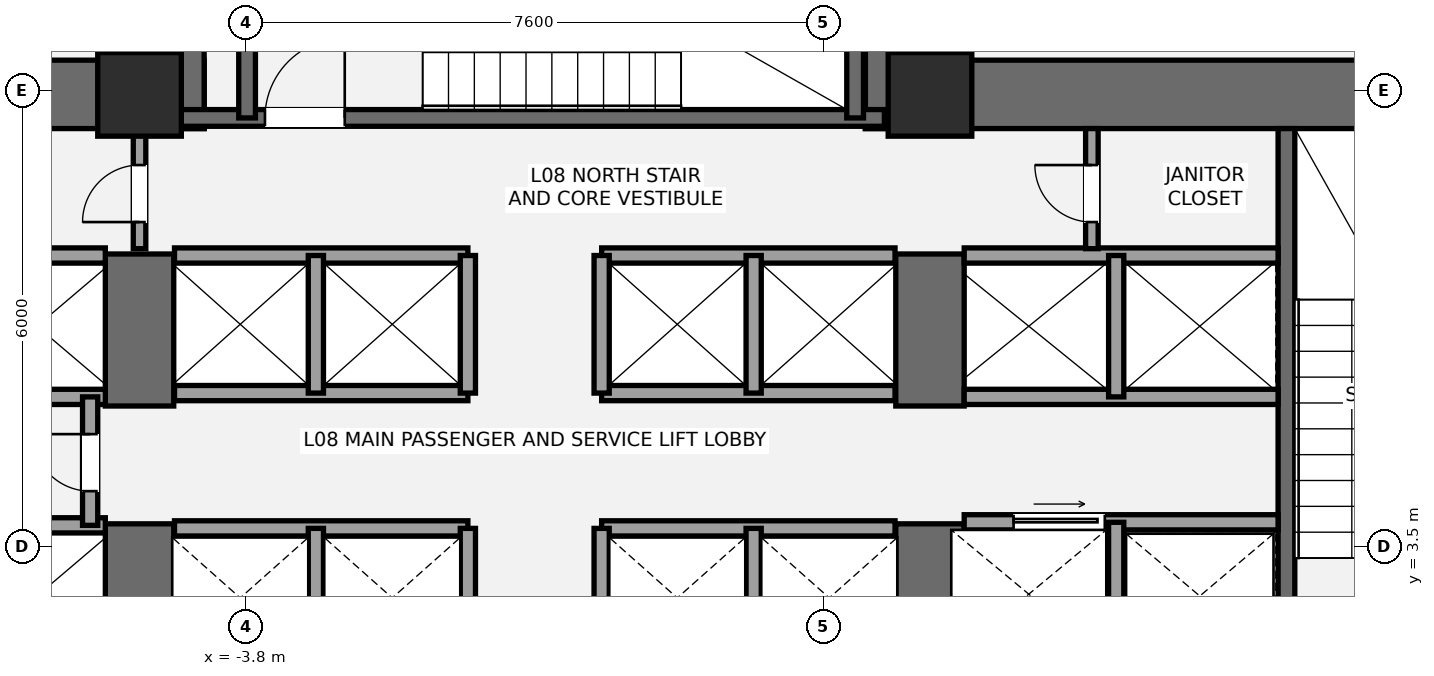
"""IFC4 building model, lengths in metres.
Left out: names, types, materials, properties, quantities, classifications, styles, units other than length and angle.
Written with IfcOpenShell. Run it as: python <this file> out.ifc"""

import sys

from ifc_helpers import new_model, si_unit, direction, frame, frame_2d, origin, origin_2d, place, context, subcontext, project, spatial, rectangle, extrude, element, fill, save


model = new_model("IFC4")
c1 = context("Model", 3, precision=1e-05, world=origin(), true_north=direction((0.0, 1.0)))
c2 = subcontext(c1, "Body", "Model", "MODEL_VIEW")
j1 = project(units=[si_unit("LENGTHUNIT", "METRE"), si_unit("PLANEANGLEUNIT", "RADIAN")], contexts=[c1])
p1 = place(None, origin())
s1 = spatial("IfcSite", under=j1, at=p1, CompositionType="ELEMENT")
p2 = place(p1, origin())
s2 = spatial("IfcBuilding", under=s1, at=p2, CompositionType="ELEMENT")
p3 = place(p2, frame((0.0, 0.0, 34.2)))
s3 = spatial("IfcBuildingStorey", under=s2, at=p3, CompositionType="ELEMENT", Elevation=34.2)
p4 = place(p3, frame((-14.05, 9.45, 0.0), z_axis=(0.0, 0.0, 1.0), x_axis=(1.0, 0.0, 0.0)))
e1 = element("IfcWall", 1, at=p4, inside=s3, PredefinedType="SHEAR", context=c2, shape_type="SweptSolid", body=[
    extrude(rectangle(XDim=9.7, YDim=0.9, at=frame_2d((4.85, 0.0))), origin(), (0.0, 0.0, 1.0), 3.6),
])
p5 = place(p3, frame((-5.2, 0.95, 0.0), z_axis=(0.0, 0.0, 1.0), x_axis=(0.0, 1.0, 0.0)))
e2 = element("IfcWall", 2, at=p5, inside=s3, PredefinedType="SHEAR", context=c2, shape_type="SweptSolid", body=[
    extrude(rectangle(XDim=2.85, YDim=0.9, at=frame_2d((1.425, 0.0))), origin(), (0.0, 0.0, 1.0), 3.6),
])
p6 = place(p3, frame((-5.2, 5.35, 0.0), z_axis=(0.0, 0.0, 1.0), x_axis=(0.0, 1.0, 0.0)))
e3 = element("IfcWall", 3, at=p6, inside=s3, PredefinedType="SHEAR", context=c2, shape_type="SweptSolid", body=[
    extrude(rectangle(XDim=2.0, YDim=0.9, at=frame_2d((1.0, 0.0))), origin(), (0.0, 0.0, 1.0), 3.6),
])
p7 = place(p3, frame((4.35, 9.45, 0.0), z_axis=(0.0, 0.0, 1.0), x_axis=(1.0, 0.0, 0.0)))
e4 = element("IfcWall", 4, at=p7, inside=s3, PredefinedType="SHEAR", context=c2, shape_type="SweptSolid", body=[
    extrude(rectangle(XDim=9.7, YDim=0.9, at=frame_2d((4.85, 0.0))), origin(), (0.0, 0.0, 1.0), 3.6),
])
p8 = place(p3, frame((5.2, 0.95, 0.0), z_axis=(0.0, 0.0, 1.0), x_axis=(0.0, 1.0, 0.0)))
e5 = element("IfcWall", 5, at=p8, inside=s3, PredefinedType="SHEAR", context=c2, shape_type="SweptSolid", body=[
    extrude(rectangle(XDim=2.85, YDim=0.9, at=frame_2d((1.425, 0.0))), origin(), (0.0, 0.0, 1.0), 3.6),
])
p9 = place(p3, frame((5.2, 5.35, 0.0), z_axis=(0.0, 0.0, 1.0), x_axis=(0.0, 1.0, 0.0)))
e6 = element("IfcWall", 6, at=p9, inside=s3, PredefinedType="SHEAR", context=c2, shape_type="SweptSolid", body=[
    extrude(rectangle(XDim=2.0, YDim=0.9, at=frame_2d((1.0, 0.0))), origin(), (0.0, 0.0, 1.0), 3.6),
])
p10 = place(p3, frame((9.89, 1.85, 0.0), z_axis=(0.0, 0.0, 1.0), x_axis=(0.0, 1.0, 0.0)))
e7 = element("IfcWall", 7, at=p10, inside=s3, PredefinedType="SHEAR", context=c2, shape_type="SweptSolid", body=[
    extrude(rectangle(XDim=7.15, YDim=0.22, at=frame_2d((3.575, 0.0))), origin(), (0.0, 0.0, 1.0), 3.6),
])
for number, where, z_axis, x_axis in (
    (8, (-4.8, 9.0, 0.0), (0.0, 0.0, 1.0), (0.0, 1.0, 0.0)),
    (9, (4.8, 9.0, 0.0), (0.0, 0.0, 1.0), (0.0, 1.0, 0.0)),
):
    element("IfcWall", number, at=place(p3, frame(where, z_axis=z_axis, x_axis=x_axis)), inside=s3, PredefinedType="SHEAR", context=c2, shape_type="SweptSolid", body=[
        extrude(rectangle(XDim=4.3, YDim=0.9, at=frame_2d((2.15, 0.0))), origin(), (0.0, 0.0, 1.0), 3.6),
    ])
p11 = place(p3, frame((-4.7, 9.14, 0.0), z_axis=(0.0, 0.0, 1.0), x_axis=(1.0, 0.0, 0.0)))
e10 = element("IfcWall", 10, at=p11, inside=s3, PredefinedType="SHEAR", context=c2, shape_type="SweptSolid", body=[
    extrude(rectangle(XDim=9.3, YDim=0.22, at=frame_2d((4.65, 0.0))), origin(), (0.0, 0.0, 1.0), 3.6),
])
p12 = place(p11, frame((1.15, 0.0, 0.0)))
e11 = element("IfcOpeningElement", 11, at=p12, cuts=e10, PredefinedType="OPENING", context=c2, shape_type="SweptSolid", body=[
    extrude(rectangle(XDim=1.05, YDim=2.15, at=frame_2d((0.525, 1.075))), frame((0.0, 0.12, 0.0), z_axis=(0.0, -1.0, 0.0), x_axis=(1.0, 0.0, 0.0)), (0.0, 0.0, 1.0), 0.24),
])
for number, where, z_axis, x_axis in (
    (12, (-3.785, 9.14, 0.0), (0.0, 0.0, 1.0), (0.0, 1.0, 0.0)),
    (13, (4.215, 9.14, 0.0), (0.0, 0.0, 1.0), (0.0, 1.0, 0.0)),
):
    element("IfcWall", number, at=place(p3, frame(where, z_axis=z_axis, x_axis=x_axis)), inside=s3, PredefinedType="SHEAR", context=c2, shape_type="SweptSolid", body=[
        extrude(rectangle(XDim=3.26, YDim=0.22, at=frame_2d((1.63, 0.0))), origin(), (0.0, 0.0, 1.0), 3.6),
    ])
for number, where, z_axis, x_axis in (
    (14, (-5.2, 9.45, 0.0), (0.0, 0.0, 1.0), (1.0, 0.0, 0.0)),
    (15, (5.2, 9.45, 0.0), (0.0, 0.0, 1.0), (1.0, 0.0, 0.0)),
):
    element("IfcColumn", number, at=place(p3, frame(where, z_axis=z_axis, x_axis=x_axis)), inside=s3, PredefinedType="COLUMN", context=c2, shape_type="SweptSolid", body=[
        extrude(rectangle(XDim=1.1, YDim=1.1, at=origin_2d()), origin(), (0.0, 0.0, 1.0), 3.6),
    ])
for number, where, z_axis, x_axis in (
    (16, (-9.78, 3.78, 0.0), (0.0, 0.0, 1.0), (1.0, 0.0, 0.0)),
    (17, (-9.78, 5.47, 0.0), (0.0, 0.0, 1.0), (1.0, 0.0, 0.0)),
    (18, (-9.78, 7.33, 0.0), (0.0, 0.0, 1.0), (1.0, 0.0, 0.0)),
):
    element("IfcWall", number, at=place(p3, frame(where, z_axis=z_axis, x_axis=x_axis)), inside=s3, PredefinedType="SOLIDWALL", context=c2, shape_type="SweptSolid", body=[
        extrude(rectangle(XDim=4.13, YDim=0.2, at=frame_2d((2.065, 0.0))), origin(), (0.0, 0.0, 1.0), 3.4),
    ])
p13 = place(p3, frame((-5.85, 3.78, 0.0), z_axis=(0.0, 0.0, 1.0), x_axis=(0.0, 1.0, 0.0)))
e19 = element("IfcWall", 19, at=p13, inside=s3, PredefinedType="SOLIDWALL", context=c2, shape_type="SweptSolid", body=[
    extrude(rectangle(XDim=1.69, YDim=0.2, at=frame_2d((0.845, 0.0))), origin(), (0.0, 0.0, 1.0), 3.4),
])
p14 = place(p13, frame((0.45, 0.0, 0.0)))
e20 = element("IfcOpeningElement", 20, at=p14, cuts=e19, PredefinedType="OPENING", context=c2, shape_type="SweptSolid", body=[
    extrude(rectangle(XDim=0.75, YDim=2.1, at=frame_2d((0.375, 1.05))), frame((0.0, 0.11, 0.0), z_axis=(0.0, -1.0, 0.0), x_axis=(1.0, 0.0, 0.0)), (0.0, 0.0, 1.0), 0.22),
])
p15 = place(p3, frame((5.65, 3.82, 0.0), z_axis=(0.0, 0.0, 1.0), x_axis=(1.0, 0.0, 0.0)))
e21 = element("IfcWall", 21, at=p15, inside=s3, PredefinedType="SOLIDWALL", context=c2, shape_type="SweptSolid", body=[
    extrude(rectangle(XDim=4.13, YDim=0.2, at=frame_2d((2.065, 0.0))), origin(), (0.0, 0.0, 1.0), 3.4),
])
p16 = place(p15, frame((0.65, 0.0, 0.0)))
e22 = element("IfcOpeningElement", 22, at=p16, cuts=e21, PredefinedType="OPENING", context=c2, shape_type="SweptSolid", body=[
    extrude(rectangle(XDim=1.2, YDim=2.2, at=frame_2d((0.6, 1.1))), frame((0.0, 0.11, 0.0), z_axis=(0.0, -1.0, 0.0), x_axis=(1.0, 0.0, 0.0)), (0.0, 0.0, 1.0), 0.22),
])
p17 = place(p3, frame((7.65, 1.85, 0.0), z_axis=(0.0, 0.0, 1.0), x_axis=(0.0, 1.0, 0.0)))
e23 = element("IfcWall", 23, at=p17, inside=s3, PredefinedType="SOLIDWALL", context=c2, shape_type="SweptSolid", body=[
    extrude(rectangle(XDim=1.97, YDim=0.2, at=frame_2d((0.985, 0.0))), origin(), (0.0, 0.0, 1.0), 3.4),
])
for number, where, z_axis, x_axis in (
    (24, (5.65, 5.47, 0.0), (0.0, 0.0, 1.0), (1.0, 0.0, 0.0)),
    (25, (5.65, 7.33, 0.0), (0.0, 0.0, 1.0), (1.0, 0.0, 0.0)),
):
    element("IfcWall", number, at=place(p3, frame(where, z_axis=z_axis, x_axis=x_axis)), inside=s3, PredefinedType="SOLIDWALL", context=c2, shape_type="SweptSolid", body=[
        extrude(rectangle(XDim=4.13, YDim=0.2, at=frame_2d((2.065, 0.0))), origin(), (0.0, 0.0, 1.0), 3.4),
    ])
p18 = place(p3, frame((7.65, 5.47, 0.0), z_axis=(0.0, 0.0, 1.0), x_axis=(0.0, 1.0, 0.0)))
e26 = element("IfcWall", 26, at=p18, inside=s3, PredefinedType="SOLIDWALL", context=c2, shape_type="SweptSolid", body=[
    extrude(rectangle(XDim=1.86, YDim=0.2, at=frame_2d((0.93, 0.0))), origin(), (0.0, 0.0, 1.0), 3.4),
])
for number, where, z_axis, x_axis in (
    (27, (-4.74, 3.74, 0.0), (0.0, 0.0, 1.0), (1.0, 0.0, 0.0)),
    (28, (0.88, 3.74, 0.0), (0.0, 0.0, 1.0), (1.0, 0.0, 0.0)),
):
    element("IfcWall", number, at=place(p3, frame(where, z_axis=z_axis, x_axis=x_axis)), inside=s3, PredefinedType="SOLIDWALL", context=c2, shape_type="SweptSolid", body=[
        extrude(rectangle(XDim=3.86, YDim=0.2, at=frame_2d((1.93, 0.0))), origin(), (0.0, 0.0, 1.0), 3.4),
    ])
for number, where, z_axis, x_axis in (
    (29, (-2.88, 1.92, 0.0), (0.0, 0.0, 1.0), (0.0, 1.0, 0.0)),
    (30, (2.88, 1.92, 0.0), (0.0, 0.0, 1.0), (0.0, 1.0, 0.0)),
    (31, (-0.88, 1.92, 0.0), (0.0, 0.0, 1.0), (0.0, 1.0, 0.0)),
    (32, (0.88, 1.92, 0.0), (0.0, 0.0, 1.0), (0.0, 1.0, 0.0)),
):
    element("IfcWall", number, at=place(p3, frame(where, z_axis=z_axis, x_axis=x_axis)), inside=s3, PredefinedType="SOLIDWALL", context=c2, shape_type="SweptSolid", body=[
        extrude(rectangle(XDim=1.82, YDim=0.2, at=frame_2d((0.91, 0.0))), origin(), (0.0, 0.0, 1.0), 3.4),
    ])
for number, where, z_axis, x_axis in (
    (33, (-4.74, 5.52, 0.0), (0.0, 0.0, 1.0), (1.0, 0.0, 0.0)),
    (34, (0.88, 5.52, 0.0), (0.0, 0.0, 1.0), (1.0, 0.0, 0.0)),
    (35, (-4.74, 7.33, 0.0), (0.0, 0.0, 1.0), (1.0, 0.0, 0.0)),
    (36, (0.88, 7.33, 0.0), (0.0, 0.0, 1.0), (1.0, 0.0, 0.0)),
):
    element("IfcWall", number, at=place(p3, frame(where, z_axis=z_axis, x_axis=x_axis)), inside=s3, PredefinedType="SOLIDWALL", context=c2, shape_type="SweptSolid", body=[
        extrude(rectangle(XDim=3.86, YDim=0.2, at=frame_2d((1.93, 0.0))), origin(), (0.0, 0.0, 1.0), 3.4),
    ])
for number, where, z_axis, x_axis in (
    (37, (-2.88, 5.52, 0.0), (0.0, 0.0, 1.0), (0.0, 1.0, 0.0)),
    (38, (2.88, 5.52, 0.0), (0.0, 0.0, 1.0), (0.0, 1.0, 0.0)),
    (39, (-0.88, 5.52, 0.0), (0.0, 0.0, 1.0), (0.0, 1.0, 0.0)),
    (40, (0.88, 5.52, 0.0), (0.0, 0.0, 1.0), (0.0, 1.0, 0.0)),
):
    element("IfcWall", number, at=place(p3, frame(where, z_axis=z_axis, x_axis=x_axis)), inside=s3, PredefinedType="SOLIDWALL", context=c2, shape_type="SweptSolid", body=[
        extrude(rectangle(XDim=1.81, YDim=0.2, at=frame_2d((0.905, 0.0))), origin(), (0.0, 0.0, 1.0), 3.4),
    ])
p19 = place(p3, frame((-5.2, 7.42, 0.0), z_axis=(0.0, 0.0, 1.0), x_axis=(0.0, 1.0, 0.0)))
e41 = element("IfcWall", 41, at=p19, inside=s3, PredefinedType="PARTITIONING", context=c2, shape_type="SweptSolid", body=[
    extrude(rectangle(XDim=1.58, YDim=0.165, at=frame_2d((0.79, 0.0))), origin(), (0.0, 0.0, 1.0), 3.4),
])
p20 = place(p19, frame((0.35, 0.0, 0.0)))
e42 = element("IfcOpeningElement", 42, at=p20, cuts=e41, PredefinedType="OPENING", context=c2, shape_type="SweptSolid", body=[
    extrude(rectangle(XDim=0.75, YDim=2.1, at=frame_2d((0.375, 1.05))), frame((0.0, 0.093, 0.0), z_axis=(0.0, -1.0, 0.0), x_axis=(1.0, 0.0, 0.0)), (0.0, 0.0, 1.0), 0.185),
])
p21 = place(p3, frame((7.33, 7.42, 0.0), z_axis=(0.0, 0.0, 1.0), x_axis=(0.0, 1.0, 0.0)))
e43 = element("IfcWall", 43, at=p21, inside=s3, PredefinedType="PARTITIONING", context=c2, shape_type="SweptSolid", body=[
    extrude(rectangle(XDim=1.58, YDim=0.165, at=frame_2d((0.79, 0.0))), origin(), (0.0, 0.0, 1.0), 3.4),
])
p22 = place(p21, frame((0.35, 0.0, 0.0)))
e44 = element("IfcOpeningElement", 44, at=p22, cuts=e43, PredefinedType="OPENING", context=c2, shape_type="SweptSolid", body=[
    extrude(rectangle(XDim=0.75, YDim=2.1, at=frame_2d((0.375, 1.05))), frame((0.0, 0.093, 0.0), z_axis=(0.0, -1.0, 0.0), x_axis=(1.0, 0.0, 0.0)), (0.0, 0.0, 1.0), 0.185),
])
p23 = place(p12, origin())
e45 = element("IfcDoor", 45, at=p23, inside=s3, OperationType="SINGLE_SWING_RIGHT", PredefinedType="DOOR", context=c2, shape_type="SweptSolid", body=[
    extrude(rectangle(XDim=1.05, YDim=2.15, at=frame_2d((0.525, 1.075))), frame((0.0, 0.025, 0.0), z_axis=(0.0, -1.0, 0.0), x_axis=(1.0, 0.0, 0.0)), (0.0, 0.0, 1.0), 0.05),
])
fill(e11, e45)
p24 = place(p14, origin())
e46 = element("IfcDoor", 46, at=p24, inside=s3, OperationType="SINGLE_SWING_RIGHT", PredefinedType="DOOR", context=c2, shape_type="SweptSolid", body=[
    extrude(rectangle(XDim=0.75, YDim=2.1, at=frame_2d((0.375, 1.05))), frame((0.0, 0.025, 0.0), z_axis=(0.0, -1.0, 0.0), x_axis=(1.0, 0.0, 0.0)), (0.0, 0.0, 1.0), 0.05),
])
fill(e20, e46)
p25 = place(p16, origin())
e47 = element("IfcDoor", 47, at=p25, inside=s3, OperationType="SLIDING_TO_RIGHT", PredefinedType="DOOR", context=c2, shape_type="SweptSolid", body=[
    extrude(rectangle(XDim=1.2, YDim=2.2, at=frame_2d((0.6, 1.1))), frame((0.0, 0.025, 0.0), z_axis=(0.0, -1.0, 0.0), x_axis=(1.0, 0.0, 0.0)), (0.0, 0.0, 1.0), 0.05),
])
fill(e22, e47)
p26 = place(p20, origin())
e48 = element("IfcDoor", 48, at=p26, inside=s3, OperationType="SINGLE_SWING_LEFT", PredefinedType="DOOR", context=c2, shape_type="SweptSolid", body=[
    extrude(rectangle(XDim=0.75, YDim=2.1, at=frame_2d((0.375, 1.05))), frame((0.0, 0.025, 0.0), z_axis=(0.0, -1.0, 0.0), x_axis=(1.0, 0.0, 0.0)), (0.0, 0.0, 1.0), 0.05),
])
fill(e42, e48)
p27 = place(p22, origin())
e49 = element("IfcDoor", 49, at=p27, inside=s3, OperationType="SINGLE_SWING_RIGHT", PredefinedType="DOOR", context=c2, shape_type="SweptSolid", body=[
    extrude(rectangle(XDim=0.75, YDim=2.1, at=frame_2d((0.375, 1.05))), frame((0.0, 0.025, 0.0), z_axis=(0.0, -1.0, 0.0), x_axis=(1.0, 0.0, 0.0)), (0.0, 0.0, 1.0), 0.05),
])
fill(e44, e49)
save(model, sys.argv[1])
